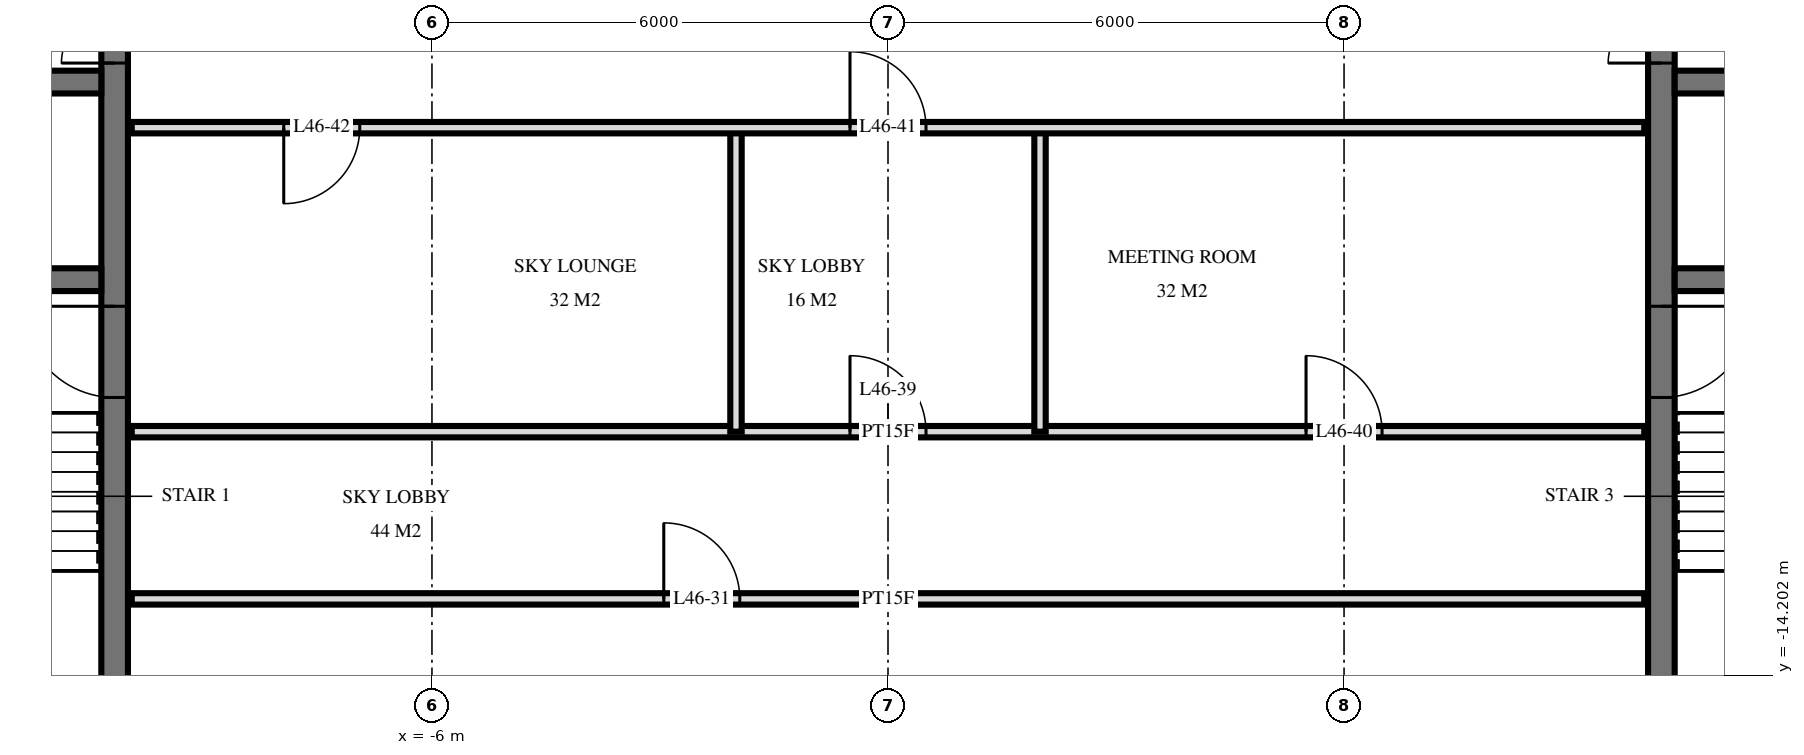
"""IFC4 building model, lengths in metres.
Left out: names, types, materials, properties, quantities, classifications, styles, units other than length and angle.
Written with IfcOpenShell. Run it as: python <this file> out.ifc"""

import sys

from ifc_helpers import new_model, si_unit, direction, frame, frame_2d, origin, place, context, subcontext, project, spatial, rectangle, extrude, element, fill, save


model = new_model("IFC4")
c1 = context("Model", 3, precision=1e-05, world=origin(), true_north=direction((0.0, 1.0)))
c2 = subcontext(c1, "Body", "Model", "MODEL_VIEW")
j1 = project(units=[si_unit("LENGTHUNIT", "METRE"), si_unit("PLANEANGLEUNIT", "RADIAN")], contexts=[c1])
p1 = place(None, origin())
s1 = spatial("IfcSite", under=j1, at=p1, CompositionType="ELEMENT")
p2 = place(p1, origin())
s2 = spatial("IfcBuilding", under=s1, at=p2, CompositionType="ELEMENT")
p3 = place(p2, frame((0.0, 0.0, 177.6)))
s3 = spatial("IfcBuildingStorey", under=s2, at=p3, CompositionType="ELEMENT", Elevation=177.6)
p4 = place(p3, frame((-10.175, -14.55, 0.0), z_axis=(0.0, 0.0, 1.0), x_axis=(0.0, 1.0, 0.0)))
e1 = element("IfcWall", 1, at=p4, inside=s3, PredefinedType="SHEAR", context=c2, shape_type="SweptSolid", body=[
    extrude(rectangle(XDim=14.1, YDim=0.35, at=frame_2d((7.05, 0.0))), origin(), (0.0, 0.0, 1.0), 6.0),
])
p5 = place(p4, frame((8.4, 0.0, 0.0)))
e2 = element("IfcOpeningElement", 2, at=p5, cuts=e1, PredefinedType="OPENING", context=c2, shape_type="SweptSolid", body=[
    extrude(rectangle(XDim=1.4, YDim=2.4, at=frame_2d((0.7, 1.2))), frame((0.0, 0.185, 0.0), z_axis=(0.0, -1.0, 0.0), x_axis=(1.0, 0.0, 0.0)), (0.0, 0.0, 1.0), 0.37),
])
p6 = place(p4, frame((10.0, 0.0, 0.0)))
e3 = element("IfcOpeningElement", 3, at=p6, cuts=e1, PredefinedType="OPENING", context=c2, shape_type="SweptSolid", body=[
    extrude(rectangle(XDim=1.4, YDim=2.4, at=frame_2d((0.7, 1.2))), frame((0.0, 0.185, 0.0), z_axis=(0.0, -1.0, 0.0), x_axis=(1.0, 0.0, 0.0)), (0.0, 0.0, 1.0), 0.37),
])
p7 = place(p4, frame((4.0, 0.0, 0.0)))
e4 = element("IfcOpeningElement", 4, at=p7, cuts=e1, PredefinedType="OPENING", context=c2, shape_type="SweptSolid", body=[
    extrude(rectangle(XDim=1.2, YDim=2.1, at=frame_2d((0.6, 1.05))), frame((0.0, 0.185, 0.0), z_axis=(0.0, -1.0, 0.0), x_axis=(1.0, 0.0, 0.0)), (0.0, 0.0, 1.0), 0.37),
])
p8 = place(p3, frame((-24.05, -6.4, 0.0), z_axis=(0.0, 0.0, 1.0), x_axis=(1.0, 0.0, 0.0)))
e5 = element("IfcWall", 5, at=p8, inside=s3, PredefinedType="SHEAR", context=c2, shape_type="SweptSolid", body=[
    extrude(rectangle(XDim=13.7, YDim=0.3, at=frame_2d((6.85, 0.0))), origin(), (0.0, 0.0, 1.0), 6.0),
])
p9 = place(p8, frame((2.95, 0.0, 0.0)))
e6 = element("IfcOpeningElement", 6, at=p9, cuts=e5, PredefinedType="OPENING", context=c2, shape_type="SweptSolid", body=[
    extrude(rectangle(XDim=1.1, YDim=2.1, at=frame_2d((0.55, 1.05))), frame((0.0, 0.16, 0.0), z_axis=(0.0, -1.0, 0.0), x_axis=(1.0, 0.0, 0.0)), (0.0, 0.0, 1.0), 0.32),
])
p10 = place(p8, frame((0.55, 0.0, 0.0)))
e7 = element("IfcOpeningElement", 7, at=p10, cuts=e5, PredefinedType="OPENING", context=c2, shape_type="SweptSolid", body=[
    extrude(rectangle(XDim=1.1, YDim=2.1, at=frame_2d((0.55, 1.05))), frame((0.0, 0.16, 0.0), z_axis=(0.0, -1.0, 0.0), x_axis=(1.0, 0.0, 0.0)), (0.0, 0.0, 1.0), 0.32),
])
p11 = place(p8, frame((5.8, 0.0, 0.0)))
e8 = element("IfcOpeningElement", 8, at=p11, cuts=e5, PredefinedType="OPENING", context=c2, shape_type="SweptSolid", body=[
    extrude(rectangle(XDim=1.1, YDim=2.1, at=frame_2d((0.55, 1.05))), frame((0.0, 0.16, 0.0), z_axis=(0.0, -1.0, 0.0), x_axis=(1.0, 0.0, 0.0)), (0.0, 0.0, 1.0), 0.32),
])
p12 = place(p3, frame((-24.05, -9.0, 0.0), z_axis=(0.0, 0.0, 1.0), x_axis=(1.0, 0.0, 0.0)))
e9 = element("IfcWall", 9, at=p12, inside=s3, PredefinedType="SHEAR", context=c2, shape_type="SweptSolid", body=[
    extrude(rectangle(XDim=13.7, YDim=0.3, at=frame_2d((6.85, 0.0))), origin(), (0.0, 0.0, 1.0), 6.0),
])
p13 = place(p12, frame((8.8, 0.0, 0.0)))
e10 = element("IfcOpeningElement", 10, at=p13, cuts=e9, PredefinedType="OPENING", context=c2, shape_type="SweptSolid", body=[
    extrude(rectangle(XDim=1.1, YDim=2.1, at=frame_2d((0.55, 1.05))), frame((0.0, 0.16, 0.0), z_axis=(0.0, -1.0, 0.0), x_axis=(1.0, 0.0, 0.0)), (0.0, 0.0, 1.0), 0.32),
])
p14 = place(p3, frame((10.175, -14.55, 0.0), z_axis=(0.0, 0.0, 1.0), x_axis=(0.0, 1.0, 0.0)))
e11 = element("IfcWall", 11, at=p14, inside=s3, PredefinedType="SHEAR", context=c2, shape_type="SweptSolid", body=[
    extrude(rectangle(XDim=14.1, YDim=0.35, at=frame_2d((7.05, 0.0))), origin(), (0.0, 0.0, 1.0), 6.0),
])
p15 = place(p14, frame((8.4, 0.0, 0.0)))
e12 = element("IfcOpeningElement", 12, at=p15, cuts=e11, PredefinedType="OPENING", context=c2, shape_type="SweptSolid", body=[
    extrude(rectangle(XDim=1.4, YDim=2.4, at=frame_2d((0.7, 1.2))), frame((0.0, 0.185, 0.0), z_axis=(0.0, -1.0, 0.0), x_axis=(1.0, 0.0, 0.0)), (0.0, 0.0, 1.0), 0.37),
])
p16 = place(p14, frame((10.0, 0.0, 0.0)))
e13 = element("IfcOpeningElement", 13, at=p16, cuts=e11, PredefinedType="OPENING", context=c2, shape_type="SweptSolid", body=[
    extrude(rectangle(XDim=1.4, YDim=2.4, at=frame_2d((0.7, 1.2))), frame((0.0, 0.185, 0.0), z_axis=(0.0, -1.0, 0.0), x_axis=(1.0, 0.0, 0.0)), (0.0, 0.0, 1.0), 0.37),
])
p17 = place(p14, frame((4.0, 0.0, 0.0)))
e14 = element("IfcOpeningElement", 14, at=p17, cuts=e11, PredefinedType="OPENING", context=c2, shape_type="SweptSolid", body=[
    extrude(rectangle(XDim=1.2, YDim=2.1, at=frame_2d((0.6, 1.05))), frame((0.0, 0.185, 0.0), z_axis=(0.0, -1.0, 0.0), x_axis=(1.0, 0.0, 0.0)), (0.0, 0.0, 1.0), 0.37),
])
p18 = place(p3, frame((10.35, -6.4, 0.0), z_axis=(0.0, 0.0, 1.0), x_axis=(1.0, 0.0, 0.0)))
e15 = element("IfcWall", 15, at=p18, inside=s3, PredefinedType="SHEAR", context=c2, shape_type="SweptSolid", body=[
    extrude(rectangle(XDim=13.7, YDim=0.3, at=frame_2d((6.85, 0.0))), origin(), (0.0, 0.0, 1.0), 6.0),
])
p19 = place(p18, frame((9.65, 0.0, 0.0)))
e16 = element("IfcOpeningElement", 16, at=p19, cuts=e15, PredefinedType="OPENING", context=c2, shape_type="SweptSolid", body=[
    extrude(rectangle(XDim=1.1, YDim=2.1, at=frame_2d((0.55, 1.05))), frame((0.0, 0.16, 0.0), z_axis=(0.0, -1.0, 0.0), x_axis=(1.0, 0.0, 0.0)), (0.0, 0.0, 1.0), 0.32),
])
p20 = place(p18, frame((12.05, 0.0, 0.0)))
e17 = element("IfcOpeningElement", 17, at=p20, cuts=e15, PredefinedType="OPENING", context=c2, shape_type="SweptSolid", body=[
    extrude(rectangle(XDim=1.1, YDim=2.1, at=frame_2d((0.55, 1.05))), frame((0.0, 0.16, 0.0), z_axis=(0.0, -1.0, 0.0), x_axis=(1.0, 0.0, 0.0)), (0.0, 0.0, 1.0), 0.32),
])
p21 = place(p18, frame((6.8, 0.0, 0.0)))
e18 = element("IfcOpeningElement", 18, at=p21, cuts=e15, PredefinedType="OPENING", context=c2, shape_type="SweptSolid", body=[
    extrude(rectangle(XDim=1.1, YDim=2.1, at=frame_2d((0.55, 1.05))), frame((0.0, 0.16, 0.0), z_axis=(0.0, -1.0, 0.0), x_axis=(1.0, 0.0, 0.0)), (0.0, 0.0, 1.0), 0.32),
])
p22 = place(p3, frame((10.35, -9.0, 0.0), z_axis=(0.0, 0.0, 1.0), x_axis=(1.0, 0.0, 0.0)))
e19 = element("IfcWall", 19, at=p22, inside=s3, PredefinedType="SHEAR", context=c2, shape_type="SweptSolid", body=[
    extrude(rectangle(XDim=13.7, YDim=0.3, at=frame_2d((6.85, 0.0))), origin(), (0.0, 0.0, 1.0), 6.0),
])
p23 = place(p22, frame((3.8, 0.0, 0.0)))
e20 = element("IfcOpeningElement", 20, at=p23, cuts=e19, PredefinedType="OPENING", context=c2, shape_type="SweptSolid", body=[
    extrude(rectangle(XDim=1.1, YDim=2.1, at=frame_2d((0.55, 1.05))), frame((0.0, 0.16, 0.0), z_axis=(0.0, -1.0, 0.0), x_axis=(1.0, 0.0, 0.0)), (0.0, 0.0, 1.0), 0.32),
])
for number, where, z_axis, x_axis in (
    (21, (2.0, -11.0, 0.0), (0.0, 0.0, 1.0), (0.0, 1.0, 0.0)),
    (22, (-2.0, -11.0, 0.0), (0.0, 0.0, 1.0), (0.0, 1.0, 0.0)),
):
    element("IfcWall", number, at=place(p3, frame(where, z_axis=z_axis, x_axis=x_axis)), inside=s3, PredefinedType="PARTITIONING", context=c2, shape_type="SweptSolid", body=[
        extrude(rectangle(XDim=4.0, YDim=0.15, at=frame_2d((2.0, 0.0))), origin(), (0.0, 0.0, 1.0), 5.7),
    ])
p24 = place(p3, frame((-9.95, -13.2, 0.0), z_axis=(0.0, 0.0, 1.0), x_axis=(1.0, 0.0, 0.0)))
e23 = element("IfcWall", 23, at=p24, inside=s3, PredefinedType="PARTITIONING", context=c2, shape_type="SweptSolid", body=[
    extrude(rectangle(XDim=19.9, YDim=0.15, at=frame_2d((9.95, 0.0))), origin(), (0.0, 0.0, 1.0), 5.7),
])
p25 = place(p24, frame((7.0, 0.0, 0.0)))
e24 = element("IfcOpeningElement", 24, at=p25, cuts=e23, PredefinedType="OPENING", context=c2, shape_type="SweptSolid", body=[
    extrude(rectangle(XDim=1.0, YDim=2.1, at=frame_2d((0.5, 1.05))), frame((0.0, 0.085, 0.0), z_axis=(0.0, -1.0, 0.0), x_axis=(1.0, 0.0, 0.0)), (0.0, 0.0, 1.0), 0.17),
])
p26 = place(p3, frame((-9.95, -11.0, 0.0), z_axis=(0.0, 0.0, 1.0), x_axis=(1.0, 0.0, 0.0)))
e25 = element("IfcWall", 25, at=p26, inside=s3, PredefinedType="PARTITIONING", context=c2, shape_type="SweptSolid", body=[
    extrude(rectangle(XDim=19.9, YDim=0.15, at=frame_2d((9.95, 0.0))), origin(), (0.0, 0.0, 1.0), 5.7),
])
p27 = place(p26, frame((9.45, 0.0, 0.0)))
e26 = element("IfcOpeningElement", 26, at=p27, cuts=e25, PredefinedType="OPENING", context=c2, shape_type="SweptSolid", body=[
    extrude(rectangle(XDim=1.0, YDim=2.1, at=frame_2d((0.5, 1.05))), frame((0.0, 0.085, 0.0), z_axis=(0.0, -1.0, 0.0), x_axis=(1.0, 0.0, 0.0)), (0.0, 0.0, 1.0), 0.17),
])
p28 = place(p26, frame((15.45, 0.0, 0.0)))
e27 = element("IfcOpeningElement", 27, at=p28, cuts=e25, PredefinedType="OPENING", context=c2, shape_type="SweptSolid", body=[
    extrude(rectangle(XDim=1.0, YDim=2.1, at=frame_2d((0.5, 1.05))), frame((0.0, 0.085, 0.0), z_axis=(0.0, -1.0, 0.0), x_axis=(1.0, 0.0, 0.0)), (0.0, 0.0, 1.0), 0.17),
])
p29 = place(p3, frame((-9.95, -7.0, 0.0), z_axis=(0.0, 0.0, 1.0), x_axis=(1.0, 0.0, 0.0)))
e28 = element("IfcWall", 28, at=p29, inside=s3, PredefinedType="PARTITIONING", context=c2, shape_type="SweptSolid", body=[
    extrude(rectangle(XDim=19.9, YDim=0.15, at=frame_2d((9.95, 0.0))), origin(), (0.0, 0.0, 1.0), 5.7),
])
p30 = place(p29, frame((9.45, 0.0, 0.0)))
e29 = element("IfcOpeningElement", 29, at=p30, cuts=e28, PredefinedType="OPENING", context=c2, shape_type="SweptSolid", body=[
    extrude(rectangle(XDim=1.0, YDim=2.1, at=frame_2d((0.5, 1.05))), frame((0.0, 0.085, 0.0), z_axis=(0.0, -1.0, 0.0), x_axis=(1.0, 0.0, 0.0)), (0.0, 0.0, 1.0), 0.17),
])
p31 = place(p29, frame((2.0, 0.0, 0.0)))
e30 = element("IfcOpeningElement", 30, at=p31, cuts=e28, PredefinedType="OPENING", context=c2, shape_type="SweptSolid", body=[
    extrude(rectangle(XDim=1.0, YDim=2.1, at=frame_2d((0.5, 1.05))), frame((0.0, 0.085, 0.0), z_axis=(0.0, -1.0, 0.0), x_axis=(1.0, 0.0, 0.0)), (0.0, 0.0, 1.0), 0.17),
])
p32 = place(p5, origin())
e31 = element("IfcDoor", 31, at=p32, inside=s3, OperationType="DOUBLE_DOOR_SINGLE_SWING", PredefinedType="DOOR", context=c2, shape_type="SweptSolid", body=[
    extrude(rectangle(XDim=1.4, YDim=2.4, at=frame_2d((0.7, 1.2))), frame((0.0, 0.025, 0.0), z_axis=(0.0, -1.0, 0.0), x_axis=(1.0, 0.0, 0.0)), (0.0, 0.0, 1.0), 0.05),
])
fill(e2, e31)
p33 = place(p7, origin())
e32 = element("IfcDoor", 32, at=p33, inside=s3, OperationType="SINGLE_SWING_LEFT", PredefinedType="DOOR", context=c2, shape_type="SweptSolid", body=[
    extrude(rectangle(XDim=1.2, YDim=2.1, at=frame_2d((0.6, 1.05))), frame((0.0, 0.025, 0.0), z_axis=(0.0, -1.0, 0.0), x_axis=(1.0, 0.0, 0.0)), (0.0, 0.0, 1.0), 0.05),
])
fill(e4, e32)
p34 = place(p15, origin())
e33 = element("IfcDoor", 33, at=p34, inside=s3, OperationType="DOUBLE_DOOR_SINGLE_SWING", PredefinedType="DOOR", context=c2, shape_type="SweptSolid", body=[
    extrude(rectangle(XDim=1.4, YDim=2.4, at=frame_2d((0.7, 1.2))), frame((0.0, 0.025, 0.0), z_axis=(0.0, -1.0, 0.0), x_axis=(1.0, 0.0, 0.0)), (0.0, 0.0, 1.0), 0.05),
])
fill(e12, e33)
p35 = place(p17, frame((0.6, 0.0, 0.0), z_axis=(0.0, 0.0, 1.0), x_axis=(-1.0, 0.0, 0.0)))
e34 = element("IfcDoor", 34, at=p35, inside=s3, OperationType="SINGLE_SWING_RIGHT", PredefinedType="DOOR", context=c2, shape_type="SweptSolid", body=[
    extrude(rectangle(XDim=1.2, YDim=2.1, at=frame_2d((0.0, 1.05))), frame((0.0, -0.025, 0.0), z_axis=(0.0, 1.0, 0.0), x_axis=(-1.0, 0.0, 0.0)), (0.0, 0.0, 1.0), 0.05),
])
fill(e14, e34)
p36 = place(p25, origin())
e35 = element("IfcDoor", 35, at=p36, inside=s3, OperationType="SINGLE_SWING_RIGHT", PredefinedType="DOOR", context=c2, shape_type="SweptSolid", body=[
    extrude(rectangle(XDim=1.0, YDim=2.1, at=frame_2d((0.5, 1.05))), frame((0.0, 0.025, 0.0), z_axis=(0.0, -1.0, 0.0), x_axis=(1.0, 0.0, 0.0)), (0.0, 0.0, 1.0), 0.05),
])
fill(e24, e35)
p37 = place(p27, origin())
e36 = element("IfcDoor", 36, at=p37, inside=s3, OperationType="SINGLE_SWING_RIGHT", PredefinedType="DOOR", context=c2, shape_type="SweptSolid", body=[
    extrude(rectangle(XDim=1.0, YDim=2.1, at=frame_2d((0.5, 1.05))), frame((0.0, 0.025, 0.0), z_axis=(0.0, -1.0, 0.0), x_axis=(1.0, 0.0, 0.0)), (0.0, 0.0, 1.0), 0.05),
])
fill(e26, e36)
p38 = place(p28, origin())
e37 = element("IfcDoor", 37, at=p38, inside=s3, OperationType="SINGLE_SWING_RIGHT", PredefinedType="DOOR", context=c2, shape_type="SweptSolid", body=[
    extrude(rectangle(XDim=1.0, YDim=2.1, at=frame_2d((0.5, 1.05))), frame((0.0, 0.025, 0.0), z_axis=(0.0, -1.0, 0.0), x_axis=(1.0, 0.0, 0.0)), (0.0, 0.0, 1.0), 0.05),
])
fill(e27, e37)
p39 = place(p30, origin())
e38 = element("IfcDoor", 38, at=p39, inside=s3, OperationType="SINGLE_SWING_RIGHT", PredefinedType="DOOR", context=c2, shape_type="SweptSolid", body=[
    extrude(rectangle(XDim=1.0, YDim=2.1, at=frame_2d((0.5, 1.05))), frame((0.0, 0.025, 0.0), z_axis=(0.0, -1.0, 0.0), x_axis=(1.0, 0.0, 0.0)), (0.0, 0.0, 1.0), 0.05),
])
fill(e29, e38)
p40 = place(p31, frame((0.5, 0.0, 0.0), z_axis=(0.0, 0.0, 1.0), x_axis=(-1.0, 0.0, 0.0)))
e39 = element("IfcDoor", 39, at=p40, inside=s3, OperationType="SINGLE_SWING_LEFT", PredefinedType="DOOR", context=c2, shape_type="SweptSolid", body=[
    extrude(rectangle(XDim=1.0, YDim=2.1, at=frame_2d((0.0, 1.05))), frame((0.0, -0.025, 0.0), z_axis=(0.0, 1.0, 0.0), x_axis=(-1.0, 0.0, 0.0)), (0.0, 0.0, 1.0), 0.05),
])
fill(e30, e39)
save(model, sys.argv[1])
